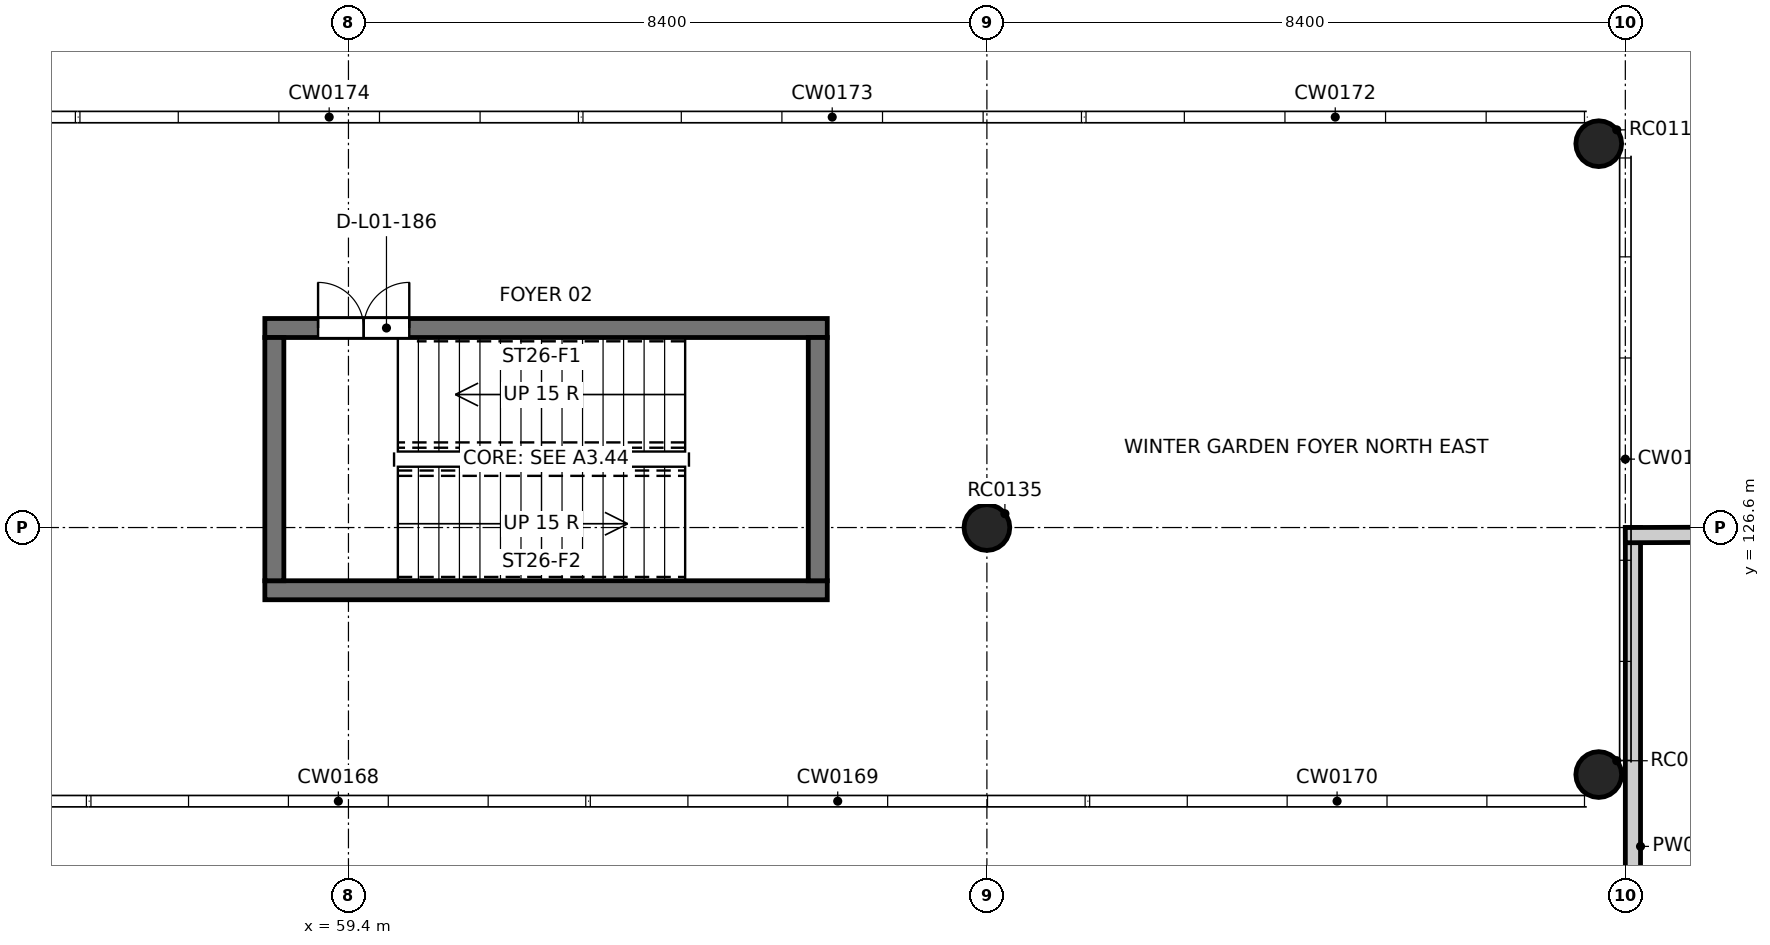
"""IFC4 building model, lengths in metres.
Left out: names, types, materials, properties, quantities, classifications, styles, units other than length and angle.
Written with IfcOpenShell. Run it as: python <this file> out.ifc"""

import sys

from ifc_helpers import new_model, si_unit, direction, frame, frame_2d, origin, origin_2d, place, context, subcontext, project, spatial, rectangle, circle, extrude, element, fill, save


model = new_model("IFC4")
c1 = context("Model", 3, precision=1e-05, world=origin(), true_north=direction((0.0, 1.0)))
c2 = subcontext(c1, "Body", "Model", "MODEL_VIEW")
j1 = project(units=[si_unit("LENGTHUNIT", "METRE"), si_unit("PLANEANGLEUNIT", "RADIAN")], contexts=[c1])
p1 = place(None, origin())
s1 = spatial("IfcSite", under=j1, at=p1, CompositionType="ELEMENT")
p2 = place(p1, origin())
s2 = spatial("IfcBuilding", under=s1, at=p2, CompositionType="ELEMENT")
p3 = place(p2, frame((0.0, 0.0, 4.8)))
s3 = spatial("IfcBuildingStorey", under=s2, at=p3, CompositionType="ELEMENT", Elevation=4.8)
for number, where, z_axis, x_axis in (
    (1, (75.85, 131.65, 0.0), (0.0, 0.0, 1.0), (1.0, 0.0, 0.0)),
    (2, (75.85, 123.35, 0.0), (0.0, 0.0, 1.0), (1.0, 0.0, 0.0)),
    (3, (67.8, 126.6, 0.0), (0.0, 0.0, 1.0), (1.0, 0.0, 0.0)),
):
    element("IfcColumn", number, at=place(p3, frame(where, z_axis=z_axis, x_axis=x_axis)), inside=s3, PredefinedType="COLUMN", context=c2, shape_type="SweptSolid", body=[
        extrude(circle(Radius=0.3, at=origin_2d()), origin(), (0.0, 0.0, 1.0), 4.8),
    ])
p4 = place(p3, frame((58.3, 125.775, 0.0), z_axis=(0.0, 0.0, 1.0), x_axis=(1.0, 0.0, 0.0)))
e4 = element("IfcWall", 4, at=p4, inside=s3, PredefinedType="SOLIDWALL", context=c2, shape_type="SweptSolid", body=[
    extrude(rectangle(XDim=7.4, YDim=0.25, at=frame_2d((3.7, 0.0))), origin(), (0.0, 0.0, 1.0), 4.8),
])
p5 = place(p3, frame((58.3, 129.225, 0.0), z_axis=(0.0, 0.0, 1.0), x_axis=(1.0, 0.0, 0.0)))
e5 = element("IfcWall", 5, at=p5, inside=s3, PredefinedType="SOLIDWALL", context=c2, shape_type="SweptSolid", body=[
    extrude(rectangle(XDim=7.4, YDim=0.25, at=frame_2d((3.7, 0.0))), origin(), (0.0, 0.0, 1.0), 4.8),
])
p6 = place(p5, frame((0.7, 0.0, 0.0)))
e6 = element("IfcOpeningElement", 6, at=p6, cuts=e5, PredefinedType="OPENING", context=c2, shape_type="SweptSolid", body=[
    extrude(rectangle(XDim=1.2, YDim=2.1, at=frame_2d((0.6, 1.05))), frame((0.0, 0.135, 0.0), z_axis=(0.0, -1.0, 0.0), x_axis=(1.0, 0.0, 0.0)), (0.0, 0.0, 1.0), 0.27),
])
for number, where, z_axis, x_axis in (
    (7, (58.425, 125.9, 0.0), (0.0, 0.0, 1.0), (0.0, 1.0, 0.0)),
    (8, (65.575, 125.9, 0.0), (0.0, 0.0, 1.0), (0.0, 1.0, 0.0)),
):
    element("IfcWall", number, at=place(p3, frame(where, z_axis=z_axis, x_axis=x_axis)), inside=s3, PredefinedType="SOLIDWALL", context=c2, shape_type="SweptSolid", body=[
        extrude(rectangle(XDim=3.2, YDim=0.25, at=frame_2d((1.6, 0.0))), origin(), (0.0, 0.0, 1.0), 4.8),
    ])
p7 = place(p3, frame((76.3, 126.6, 0.0), z_axis=(0.0, 0.0, 1.0), x_axis=(0.0, -1.0, 0.0)))
e9 = element("IfcWall", 9, at=p7, inside=s3, PredefinedType="PARAPET", context=c2, shape_type="SweptSolid", body=[
    extrude(rectangle(XDim=8.39, YDim=0.2, at=frame_2d((4.195, 0.0))), origin(), (0.0, 0.0, 1.0), 1.1),
])
p8 = place(p3, frame((101.3, 126.6, 0.0), z_axis=(0.0, 0.0, 1.0), x_axis=(-0.999992048112, -0.003987945994, 0.0)))
e10 = element("IfcWall", 10, at=p8, inside=s3, PredefinedType="PARAPET", context=c2, shape_type="SweptSolid", body=[
    extrude(rectangle(XDim=25.1, YDim=0.2, at=frame_2d((12.55, 0.0))), origin(), (0.0, 0.0, 1.0), 1.1),
])
p9 = place(p6, origin())
e11 = element("IfcDoor", 11, at=p9, inside=s3, OperationType="DOUBLE_DOOR_SINGLE_SWING", PredefinedType="DOOR", context=c2, shape_type="SweptSolid", body=[
    extrude(rectangle(XDim=1.2, YDim=2.1, at=frame_2d((0.6, 1.05))), frame((0.0, 0.025, 0.0), z_axis=(0.0, -1.0, 0.0), x_axis=(1.0, 0.0, 0.0)), (0.0, 0.0, 1.0), 0.05),
])
fill(e6, e11)
save(model, sys.argv[1])
